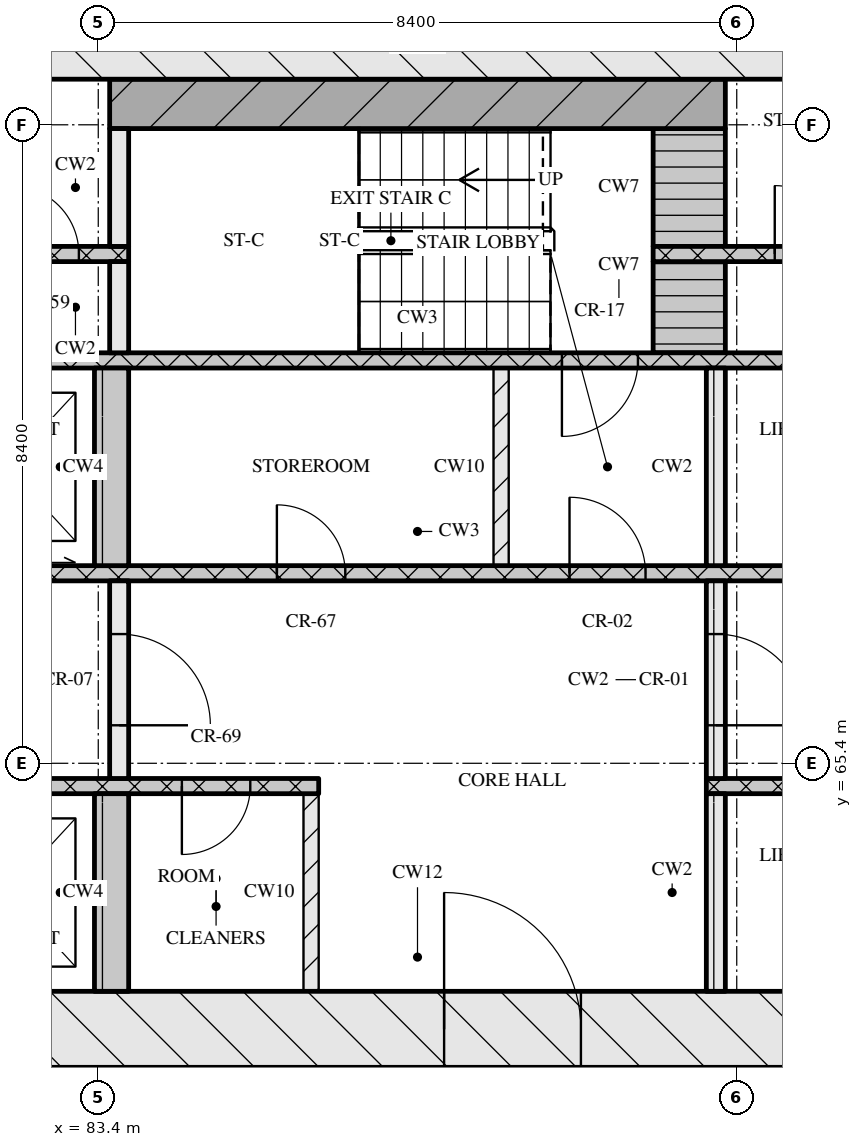
"""IFC4 building model, lengths in metres.
Left out: names, types, materials, properties, quantities, classifications, styles, units other than length and angle.
Written with IfcOpenShell. Run it as: python <this file> out.ifc"""

import sys

from ifc_helpers import new_model, si_unit, direction, frame, frame_2d, origin, place, context, subcontext, project, spatial, rectangle, extrude, element, fill, save


model = new_model("IFC4")
c1 = context("Model", 3, precision=1e-05, world=origin(), true_north=direction((0.0, 1.0)))
c2 = subcontext(c1, "Body", "Model", "MODEL_VIEW")
j1 = project(units=[si_unit("LENGTHUNIT", "METRE"), si_unit("PLANEANGLEUNIT", "RADIAN")], contexts=[c1])
p1 = place(None, origin())
s1 = spatial("IfcSite", under=j1, at=p1, CompositionType="ELEMENT")
p2 = place(p1, origin())
s2 = spatial("IfcBuilding", under=s1, at=p2, CompositionType="ELEMENT")
p3 = place(p2, frame((0.0, 0.0, 113.25)))
s3 = spatial("IfcBuildingStorey", under=s2, at=p3, CompositionType="ELEMENT", Elevation=113.25)
p4 = place(p3, frame((66.8, 61.9, 0.0), z_axis=(0.0, 0.0, 1.0), x_axis=(1.0, 0.0, 0.0)))
e1 = element("IfcWall", 1, at=p4, inside=s3, PredefinedType="SOLIDWALL", context=c2, shape_type="SweptSolid", body=[
    extrude(rectangle(XDim=41.6, YDim=1.0, at=frame_2d((20.8, 0.0))), origin(), (0.0, 0.0, 1.0), 3.32),
])
p5 = place(p4, frame((21.15, 0.0, 0.0)))
e2 = element("IfcOpeningElement", 2, at=p5, cuts=e1, PredefinedType="OPENING", context=c2, shape_type="SweptSolid", body=[
    extrude(rectangle(XDim=1.8, YDim=2.1, at=frame_2d((0.9, 1.05))), frame((0.0, 0.51, 0.0), z_axis=(0.0, -1.0, 0.0), x_axis=(1.0, 0.0, 0.0)), (0.0, 0.0, 1.0), 1.02),
])
p6 = place(p3, frame((66.8, 74.9, 0.0), z_axis=(0.0, 0.0, 1.0), x_axis=(1.0, 0.0, 0.0)))
e3 = element("IfcWall", 3, at=p6, inside=s3, PredefinedType="SOLIDWALL", context=c2, shape_type="SweptSolid", body=[
    extrude(rectangle(XDim=41.6, YDim=1.0, at=frame_2d((20.8, 0.0))), origin(), (0.0, 0.0, 1.0), 3.32),
])
p7 = place(p3, frame((83.575, 62.4, 0.0), z_axis=(0.0, 0.0, 1.0), x_axis=(0.0, 1.0, 0.0)))
e4 = element("IfcWall", 4, at=p7, inside=s3, PredefinedType="SOLIDWALL", context=c2, shape_type="SweptSolid", body=[
    extrude(rectangle(XDim=2.6, YDim=0.45, at=frame_2d((1.3, 0.0))), origin(), (0.0, 0.0, 1.0), 3.32),
])
p8 = place(p3, frame((86.2, 62.4, 0.0), z_axis=(0.0, 0.0, 1.0), x_axis=(0.0, 1.0, 0.0)))
e5 = element("IfcWall", 5, at=p8, inside=s3, PredefinedType="PARTITIONING", context=c2, shape_type="SweptSolid", body=[
    extrude(rectangle(XDim=2.6, YDim=0.2, at=frame_2d((1.3, 0.0))), origin(), (0.0, 0.0, 1.0), 3.32),
])
p9 = place(p3, frame((91.525, 62.4, 0.0), z_axis=(0.0, 0.0, 1.0), x_axis=(0.0, 1.0, 0.0)))
e6 = element("IfcWall", 6, at=p9, inside=s3, PredefinedType="SOLIDWALL", context=c2, shape_type="SweptSolid", body=[
    extrude(rectangle(XDim=2.6, YDim=0.25, at=frame_2d((1.3, 0.0))), origin(), (0.0, 0.0, 1.0), 3.32),
])
p10 = place(p3, frame((67.8, 65.1, 0.0), z_axis=(0.0, 0.0, 1.0), x_axis=(1.0, 0.0, 0.0)))
e7 = element("IfcWall", 7, at=p10, inside=s3, PredefinedType="SOLIDWALL", context=c2, shape_type="SweptSolid", body=[
    extrude(rectangle(XDim=18.5, YDim=0.2, at=frame_2d((9.25, 0.0))), origin(), (0.0, 0.0, 1.0), 3.32),
])
p11 = place(p10, frame((7.27, 0.0, 0.0)))
e8 = element("IfcOpeningElement", 8, at=p11, cuts=e7, PredefinedType="OPENING", context=c2, shape_type="SweptSolid", body=[
    extrude(rectangle(XDim=0.9, YDim=2.1, at=frame_2d((0.45, 1.05))), frame((0.0, 0.11, 0.0), z_axis=(0.0, -1.0, 0.0), x_axis=(1.0, 0.0, 0.0)), (0.0, 0.0, 1.0), 0.22),
])
p12 = place(p10, frame((8.85, 0.0, 0.0)))
e9 = element("IfcOpeningElement", 9, at=p12, cuts=e7, PredefinedType="OPENING", context=c2, shape_type="SweptSolid", body=[
    extrude(rectangle(XDim=1.1, YDim=2.1, at=frame_2d((0.55, 1.05))), frame((0.0, 0.11, 0.0), z_axis=(0.0, -1.0, 0.0), x_axis=(1.0, 0.0, 0.0)), (0.0, 0.0, 1.0), 0.22),
])
p13 = place(p10, frame((11.35, 0.0, 0.0)))
e10 = element("IfcOpeningElement", 10, at=p13, cuts=e7, PredefinedType="OPENING", context=c2, shape_type="SweptSolid", body=[
    extrude(rectangle(XDim=1.1, YDim=2.1, at=frame_2d((0.55, 1.05))), frame((0.0, 0.11, 0.0), z_axis=(0.0, -1.0, 0.0), x_axis=(1.0, 0.0, 0.0)), (0.0, 0.0, 1.0), 0.22),
])
p14 = place(p10, frame((13.85, 0.0, 0.0)))
e11 = element("IfcOpeningElement", 11, at=p14, cuts=e7, PredefinedType="OPENING", context=c2, shape_type="SweptSolid", body=[
    extrude(rectangle(XDim=1.1, YDim=2.1, at=frame_2d((0.55, 1.05))), frame((0.0, 0.11, 0.0), z_axis=(0.0, -1.0, 0.0), x_axis=(1.0, 0.0, 0.0)), (0.0, 0.0, 1.0), 0.22),
])
p15 = place(p10, frame((16.7, 0.0, 0.0)))
e12 = element("IfcOpeningElement", 12, at=p15, cuts=e7, PredefinedType="OPENING", context=c2, shape_type="SweptSolid", body=[
    extrude(rectangle(XDim=0.9, YDim=2.1, at=frame_2d((0.45, 1.05))), frame((0.0, 0.11, 0.0), z_axis=(0.0, -1.0, 0.0), x_axis=(1.0, 0.0, 0.0)), (0.0, 0.0, 1.0), 0.22),
])
p16 = place(p3, frame((91.4, 65.1, 0.0), z_axis=(0.0, 0.0, 1.0), x_axis=(1.0, 0.0, 0.0)))
e13 = element("IfcWall", 13, at=p16, inside=s3, PredefinedType="SOLIDWALL", context=c2, shape_type="SweptSolid", body=[
    extrude(rectangle(XDim=16.0, YDim=0.2, at=frame_2d((8.0, 0.0))), origin(), (0.0, 0.0, 1.0), 3.32),
])
p17 = place(p16, frame((7.83, 0.0, 0.0)))
e14 = element("IfcOpeningElement", 14, at=p17, cuts=e13, PredefinedType="OPENING", context=c2, shape_type="SweptSolid", body=[
    extrude(rectangle(XDim=0.9, YDim=2.1, at=frame_2d((0.45, 1.05))), frame((0.0, 0.11, 0.0), z_axis=(0.0, -1.0, 0.0), x_axis=(1.0, 0.0, 0.0)), (0.0, 0.0, 1.0), 0.22),
])
p18 = place(p3, frame((83.675, 65.2, 0.0), z_axis=(0.0, 0.0, 1.0), x_axis=(0.0, 1.0, 0.0)))
e15 = element("IfcWall", 15, at=p18, inside=s3, PredefinedType="SOLIDWALL", context=c2, shape_type="SweptSolid", body=[
    extrude(rectangle(XDim=2.6, YDim=0.25, at=frame_2d((1.3, 0.0))), origin(), (0.0, 0.0, 1.0), 3.32),
])
p19 = place(p18, frame((0.7, 0.0, 0.0)))
e16 = element("IfcOpeningElement", 16, at=p19, cuts=e15, PredefinedType="OPENING", context=c2, shape_type="SweptSolid", body=[
    extrude(rectangle(XDim=1.2, YDim=2.1, at=frame_2d((0.6, 1.05))), frame((0.0, 0.135, 0.0), z_axis=(0.0, -1.0, 0.0), x_axis=(1.0, 0.0, 0.0)), (0.0, 0.0, 1.0), 0.27),
])
p20 = place(p3, frame((91.525, 65.2, 0.0), z_axis=(0.0, 0.0, 1.0), x_axis=(0.0, 1.0, 0.0)))
e17 = element("IfcWall", 17, at=p20, inside=s3, PredefinedType="SOLIDWALL", context=c2, shape_type="SweptSolid", body=[
    extrude(rectangle(XDim=2.6, YDim=0.25, at=frame_2d((1.3, 0.0))), origin(), (0.0, 0.0, 1.0), 3.32),
])
p21 = place(p20, frame((0.7, 0.0, 0.0)))
e18 = element("IfcOpeningElement", 18, at=p21, cuts=e17, PredefinedType="OPENING", context=c2, shape_type="SweptSolid", body=[
    extrude(rectangle(XDim=1.2, YDim=2.1, at=frame_2d((0.6, 1.05))), frame((0.0, 0.135, 0.0), z_axis=(0.0, -1.0, 0.0), x_axis=(1.0, 0.0, 0.0)), (0.0, 0.0, 1.0), 0.27),
])
p22 = place(p3, frame((76.05, 67.9, 0.0), z_axis=(0.0, 0.0, 1.0), x_axis=(1.0, 0.0, 0.0)))
e19 = element("IfcWall", 19, at=p22, inside=s3, PredefinedType="SOLIDWALL", context=c2, shape_type="SweptSolid", body=[
    extrude(rectangle(XDim=23.1, YDim=0.2, at=frame_2d((11.55, 0.0))), origin(), (0.0, 0.0, 1.0), 3.32),
])
p23 = place(p22, frame((0.6, 0.0, 0.0)))
e20 = element("IfcOpeningElement", 20, at=p23, cuts=e19, PredefinedType="OPENING", context=c2, shape_type="SweptSolid", body=[
    extrude(rectangle(XDim=1.1, YDim=2.1, at=frame_2d((0.55, 1.05))), frame((0.0, 0.11, 0.0), z_axis=(0.0, -1.0, 0.0), x_axis=(1.0, 0.0, 0.0)), (0.0, 0.0, 1.0), 0.22),
])
p24 = place(p22, frame((3.1, 0.0, 0.0)))
e21 = element("IfcOpeningElement", 21, at=p24, cuts=e19, PredefinedType="OPENING", context=c2, shape_type="SweptSolid", body=[
    extrude(rectangle(XDim=1.1, YDim=2.1, at=frame_2d((0.55, 1.05))), frame((0.0, 0.11, 0.0), z_axis=(0.0, -1.0, 0.0), x_axis=(1.0, 0.0, 0.0)), (0.0, 0.0, 1.0), 0.22),
])
p25 = place(p22, frame((5.6, 0.0, 0.0)))
e22 = element("IfcOpeningElement", 22, at=p25, cuts=e19, PredefinedType="OPENING", context=c2, shape_type="SweptSolid", body=[
    extrude(rectangle(XDim=1.1, YDim=2.1, at=frame_2d((0.55, 1.05))), frame((0.0, 0.11, 0.0), z_axis=(0.0, -1.0, 0.0), x_axis=(1.0, 0.0, 0.0)), (0.0, 0.0, 1.0), 0.22),
])
p26 = place(p22, frame((9.7, 0.0, 0.0)))
e23 = element("IfcOpeningElement", 23, at=p26, cuts=e19, PredefinedType="OPENING", context=c2, shape_type="SweptSolid", body=[
    extrude(rectangle(XDim=0.9, YDim=2.1, at=frame_2d((0.45, 1.05))), frame((0.0, 0.11, 0.0), z_axis=(0.0, -1.0, 0.0), x_axis=(1.0, 0.0, 0.0)), (0.0, 0.0, 1.0), 0.22),
])
p27 = place(p22, frame((13.55, 0.0, 0.0)))
e24 = element("IfcOpeningElement", 24, at=p27, cuts=e19, PredefinedType="OPENING", context=c2, shape_type="SweptSolid", body=[
    extrude(rectangle(XDim=1.0, YDim=2.1, at=frame_2d((0.5, 1.05))), frame((0.0, 0.11, 0.0), z_axis=(0.0, -1.0, 0.0), x_axis=(1.0, 0.0, 0.0)), (0.0, 0.0, 1.0), 0.22),
])
p28 = place(p3, frame((83.575, 68.0, 0.0), z_axis=(0.0, 0.0, 1.0), x_axis=(0.0, 1.0, 0.0)))
e25 = element("IfcWall", 25, at=p28, inside=s3, PredefinedType="SOLIDWALL", context=c2, shape_type="SweptSolid", body=[
    extrude(rectangle(XDim=2.6, YDim=0.45, at=frame_2d((1.3, 0.0))), origin(), (0.0, 0.0, 1.0), 3.32),
])
p29 = place(p3, frame((88.7, 68.0, 0.0), z_axis=(0.0, 0.0, 1.0), x_axis=(0.0, 1.0, 0.0)))
e26 = element("IfcWall", 26, at=p29, inside=s3, PredefinedType="PARTITIONING", context=c2, shape_type="SweptSolid", body=[
    extrude(rectangle(XDim=2.6, YDim=0.2, at=frame_2d((1.3, 0.0))), origin(), (0.0, 0.0, 1.0), 3.32),
])
p30 = place(p3, frame((91.525, 68.0, 0.0), z_axis=(0.0, 0.0, 1.0), x_axis=(0.0, 1.0, 0.0)))
e27 = element("IfcWall", 27, at=p30, inside=s3, PredefinedType="SOLIDWALL", context=c2, shape_type="SweptSolid", body=[
    extrude(rectangle(XDim=2.6, YDim=0.25, at=frame_2d((1.3, 0.0))), origin(), (0.0, 0.0, 1.0), 3.32),
])
p31 = place(p3, frame((67.8, 70.7, 0.0), z_axis=(0.0, 0.0, 1.0), x_axis=(1.0, 0.0, 0.0)))
e28 = element("IfcWall", 28, at=p31, inside=s3, PredefinedType="SOLIDWALL", context=c2, shape_type="SweptSolid", body=[
    extrude(rectangle(XDim=39.6, YDim=0.2, at=frame_2d((19.8, 0.0))), origin(), (0.0, 0.0, 1.0), 3.32),
])
p32 = place(p31, frame((0.65, 0.0, 0.0)))
e29 = element("IfcOpeningElement", 29, at=p32, cuts=e28, PredefinedType="OPENING", context=c2, shape_type="SweptSolid", body=[
    extrude(rectangle(XDim=1.1, YDim=2.1, at=frame_2d((0.55, 1.05))), frame((0.0, 0.11, 0.0), z_axis=(0.0, -1.0, 0.0), x_axis=(1.0, 0.0, 0.0)), (0.0, 0.0, 1.0), 0.22),
])
p33 = place(p31, frame((3.25, 0.0, 0.0)))
e30 = element("IfcOpeningElement", 30, at=p33, cuts=e28, PredefinedType="OPENING", context=c2, shape_type="SweptSolid", body=[
    extrude(rectangle(XDim=1.1, YDim=2.1, at=frame_2d((0.55, 1.05))), frame((0.0, 0.11, 0.0), z_axis=(0.0, -1.0, 0.0), x_axis=(1.0, 0.0, 0.0)), (0.0, 0.0, 1.0), 0.22),
])
p34 = place(p31, frame((5.9, 0.0, 0.0)))
e31 = element("IfcOpeningElement", 31, at=p34, cuts=e28, PredefinedType="OPENING", context=c2, shape_type="SweptSolid", body=[
    extrude(rectangle(XDim=1.0, YDim=2.1, at=frame_2d((0.5, 1.05))), frame((0.0, 0.11, 0.0), z_axis=(0.0, -1.0, 0.0), x_axis=(1.0, 0.0, 0.0)), (0.0, 0.0, 1.0), 0.22),
])
p35 = place(p31, frame((21.7, 0.0, 0.0)))
e32 = element("IfcOpeningElement", 32, at=p35, cuts=e28, PredefinedType="OPENING", context=c2, shape_type="SweptSolid", body=[
    extrude(rectangle(XDim=1.0, YDim=2.1, at=frame_2d((0.5, 1.05))), frame((0.0, 0.11, 0.0), z_axis=(0.0, -1.0, 0.0), x_axis=(1.0, 0.0, 0.0)), (0.0, 0.0, 1.0), 0.22),
])
p36 = place(p31, frame((32.7, 0.0, 0.0)))
e33 = element("IfcOpeningElement", 33, at=p36, cuts=e28, PredefinedType="OPENING", context=c2, shape_type="SweptSolid", body=[
    extrude(rectangle(XDim=1.0, YDim=2.1, at=frame_2d((0.5, 1.05))), frame((0.0, 0.11, 0.0), z_axis=(0.0, -1.0, 0.0), x_axis=(1.0, 0.0, 0.0)), (0.0, 0.0, 1.0), 0.22),
])
p37 = place(p31, frame((35.25, 0.0, 0.0)))
e34 = element("IfcOpeningElement", 34, at=p37, cuts=e28, PredefinedType="OPENING", context=c2, shape_type="SweptSolid", body=[
    extrude(rectangle(XDim=1.1, YDim=2.1, at=frame_2d((0.55, 1.05))), frame((0.0, 0.11, 0.0), z_axis=(0.0, -1.0, 0.0), x_axis=(1.0, 0.0, 0.0)), (0.0, 0.0, 1.0), 0.22),
])
p38 = place(p31, frame((37.85, 0.0, 0.0)))
e35 = element("IfcOpeningElement", 35, at=p38, cuts=e28, PredefinedType="OPENING", context=c2, shape_type="SweptSolid", body=[
    extrude(rectangle(XDim=1.1, YDim=2.1, at=frame_2d((0.55, 1.05))), frame((0.0, 0.11, 0.0), z_axis=(0.0, -1.0, 0.0), x_axis=(1.0, 0.0, 0.0)), (0.0, 0.0, 1.0), 0.22),
])
p39 = place(p3, frame((83.675, 70.8, 0.0), z_axis=(0.0, 0.0, 1.0), x_axis=(0.0, 1.0, 0.0)))
e36 = element("IfcWall", 36, at=p39, inside=s3, PredefinedType="SOLIDWALL", context=c2, shape_type="SweptSolid", body=[
    extrude(rectangle(XDim=1.2, YDim=0.25, at=frame_2d((0.6, 0.0))), origin(), (0.0, 0.0, 1.0), 3.32),
])
p40 = place(p3, frame((91.175, 70.8, 0.0), z_axis=(0.0, 0.0, 1.0), x_axis=(0.0, 1.0, 0.0)))
e37 = element("IfcWall", 37, at=p40, inside=s3, PredefinedType="SOLIDWALL", context=c2, shape_type="SweptSolid", body=[
    extrude(rectangle(XDim=1.2, YDim=0.95, at=frame_2d((0.6, 0.0))), origin(), (0.0, 0.0, 1.0), 3.32),
])
p41 = place(p3, frame((72.8, 72.1, 0.0), z_axis=(0.0, 0.0, 1.0), x_axis=(1.0, 0.0, 0.0)))
e38 = element("IfcWall", 38, at=p41, inside=s3, PredefinedType="SOLIDWALL", context=c2, shape_type="SweptSolid", body=[
    extrude(rectangle(XDim=11.0, YDim=0.2, at=frame_2d((5.5, 0.0))), origin(), (0.0, 0.0, 1.0), 3.32),
])
p42 = place(p41, frame((1.25, 0.0, 0.0)))
e39 = element("IfcOpeningElement", 39, at=p42, cuts=e38, PredefinedType="OPENING", context=c2, shape_type="SweptSolid", body=[
    extrude(rectangle(XDim=0.9, YDim=2.1, at=frame_2d((0.45, 1.05))), frame((0.0, 0.11, 0.0), z_axis=(0.0, -1.0, 0.0), x_axis=(1.0, 0.0, 0.0)), (0.0, 0.0, 1.0), 0.22),
])
p43 = place(p41, frame((4.65, 0.0, 0.0)))
e40 = element("IfcOpeningElement", 40, at=p43, cuts=e38, PredefinedType="OPENING", context=c2, shape_type="SweptSolid", body=[
    extrude(rectangle(XDim=0.9, YDim=2.1, at=frame_2d((0.45, 1.05))), frame((0.0, 0.11, 0.0), z_axis=(0.0, -1.0, 0.0), x_axis=(1.0, 0.0, 0.0)), (0.0, 0.0, 1.0), 0.22),
])
p44 = place(p41, frame((7.47, 0.0, 0.0)))
e41 = element("IfcOpeningElement", 41, at=p44, cuts=e38, PredefinedType="OPENING", context=c2, shape_type="SweptSolid", body=[
    extrude(rectangle(XDim=0.9, YDim=2.1, at=frame_2d((0.45, 1.05))), frame((0.0, 0.11, 0.0), z_axis=(0.0, -1.0, 0.0), x_axis=(1.0, 0.0, 0.0)), (0.0, 0.0, 1.0), 0.22),
])
p45 = place(p41, frame((9.445, 0.0, 0.0)))
e42 = element("IfcOpeningElement", 42, at=p45, cuts=e38, PredefinedType="OPENING", context=c2, shape_type="SweptSolid", body=[
    extrude(rectangle(XDim=0.9, YDim=2.1, at=frame_2d((0.45, 1.05))), frame((0.0, 0.11, 0.0), z_axis=(0.0, -1.0, 0.0), x_axis=(1.0, 0.0, 0.0)), (0.0, 0.0, 1.0), 0.22),
])
p46 = place(p3, frame((90.7, 72.1, 0.0), z_axis=(0.0, 0.0, 1.0), x_axis=(1.0, 0.0, 0.0)))
e43 = element("IfcWall", 43, at=p46, inside=s3, PredefinedType="SOLIDWALL", context=c2, shape_type="SweptSolid", body=[
    extrude(rectangle(XDim=11.7, YDim=0.2, at=frame_2d((5.85, 0.0))), origin(), (0.0, 0.0, 1.0), 3.32),
])
p47 = place(p46, frame((1.6, 0.0, 0.0)))
e44 = element("IfcOpeningElement", 44, at=p47, cuts=e43, PredefinedType="OPENING", context=c2, shape_type="SweptSolid", body=[
    extrude(rectangle(XDim=0.9, YDim=2.1, at=frame_2d((0.45, 1.05))), frame((0.0, 0.11, 0.0), z_axis=(0.0, -1.0, 0.0), x_axis=(1.0, 0.0, 0.0)), (0.0, 0.0, 1.0), 0.22),
])
p48 = place(p46, frame((5.335, 0.0, 0.0)))
e45 = element("IfcOpeningElement", 45, at=p48, cuts=e43, PredefinedType="OPENING", context=c2, shape_type="SweptSolid", body=[
    extrude(rectangle(XDim=0.9, YDim=2.1, at=frame_2d((0.45, 1.05))), frame((0.0, 0.11, 0.0), z_axis=(0.0, -1.0, 0.0), x_axis=(1.0, 0.0, 0.0)), (0.0, 0.0, 1.0), 0.22),
])
p49 = place(p46, frame((9.55, 0.0, 0.0)))
e46 = element("IfcOpeningElement", 46, at=p49, cuts=e43, PredefinedType="OPENING", context=c2, shape_type="SweptSolid", body=[
    extrude(rectangle(XDim=0.9, YDim=2.1, at=frame_2d((0.45, 1.05))), frame((0.0, 0.11, 0.0), z_axis=(0.0, -1.0, 0.0), x_axis=(1.0, 0.0, 0.0)), (0.0, 0.0, 1.0), 0.22),
])
p50 = place(p3, frame((83.675, 72.2, 0.0), z_axis=(0.0, 0.0, 1.0), x_axis=(0.0, 1.0, 0.0)))
e47 = element("IfcWall", 47, at=p50, inside=s3, PredefinedType="SOLIDWALL", context=c2, shape_type="SweptSolid", body=[
    extrude(rectangle(XDim=1.55, YDim=0.25, at=frame_2d((0.775, 0.0))), origin(), (0.0, 0.0, 1.0), 3.32),
])
p51 = place(p3, frame((91.175, 72.2, 0.0), z_axis=(0.0, 0.0, 1.0), x_axis=(0.0, 1.0, 0.0)))
e48 = element("IfcWall", 48, at=p51, inside=s3, PredefinedType="SOLIDWALL", context=c2, shape_type="SweptSolid", body=[
    extrude(rectangle(XDim=1.55, YDim=0.95, at=frame_2d((0.775, 0.0))), origin(), (0.0, 0.0, 1.0), 3.32),
])
p52 = place(p3, frame((83.55, 74.075, 0.0), z_axis=(0.0, 0.0, 1.0), x_axis=(1.0, 0.0, 0.0)))
e49 = element("IfcWall", 49, at=p52, inside=s3, PredefinedType="SOLIDWALL", context=c2, shape_type="SweptSolid", body=[
    extrude(rectangle(XDim=8.1, YDim=0.65, at=frame_2d((4.05, 0.0))), origin(), (0.0, 0.0, 1.0), 3.32),
])
p53 = place(p5, origin())
e50 = element("IfcDoor", 50, at=p53, inside=s3, OperationType="DOUBLE_DOOR_SINGLE_SWING", PredefinedType="DOOR", context=c2, shape_type="SweptSolid", body=[
    extrude(rectangle(XDim=1.8, YDim=2.1, at=frame_2d((0.9, 1.05))), frame((0.0, 0.025, 0.0), z_axis=(0.0, -1.0, 0.0), x_axis=(1.0, 0.0, 0.0)), (0.0, 0.0, 1.0), 0.05),
])
fill(e2, e50)
p54 = place(p15, origin())
e51 = element("IfcDoor", 51, at=p54, inside=s3, OperationType="SINGLE_SWING_RIGHT", PredefinedType="DOOR", context=c2, shape_type="SweptSolid", body=[
    extrude(rectangle(XDim=0.9, YDim=2.1, at=frame_2d((0.45, 1.05))), frame((0.0, 0.025, 0.0), z_axis=(0.0, -1.0, 0.0), x_axis=(1.0, 0.0, 0.0)), (0.0, 0.0, 1.0), 0.05),
])
fill(e12, e51)
p55 = place(p19, origin())
e52 = element("IfcDoor", 52, at=p55, inside=s3, OperationType="SINGLE_SWING_RIGHT", PredefinedType="DOOR", context=c2, shape_type="SweptSolid", body=[
    extrude(rectangle(XDim=1.2, YDim=2.1, at=frame_2d((0.6, 1.05))), frame((0.0, 0.025, 0.0), z_axis=(0.0, -1.0, 0.0), x_axis=(1.0, 0.0, 0.0)), (0.0, 0.0, 1.0), 0.05),
])
fill(e16, e52)
p56 = place(p21, origin())
e53 = element("IfcDoor", 53, at=p56, inside=s3, OperationType="SINGLE_SWING_RIGHT", PredefinedType="DOOR", context=c2, shape_type="SweptSolid", body=[
    extrude(rectangle(XDim=1.2, YDim=2.1, at=frame_2d((0.6, 1.05))), frame((0.0, 0.025, 0.0), z_axis=(0.0, -1.0, 0.0), x_axis=(1.0, 0.0, 0.0)), (0.0, 0.0, 1.0), 0.05),
])
fill(e18, e53)
p57 = place(p26, origin())
e54 = element("IfcDoor", 54, at=p57, inside=s3, OperationType="SINGLE_SWING_LEFT", PredefinedType="DOOR", context=c2, shape_type="SweptSolid", body=[
    extrude(rectangle(XDim=0.9, YDim=2.1, at=frame_2d((0.45, 1.05))), frame((0.0, 0.025, 0.0), z_axis=(0.0, -1.0, 0.0), x_axis=(1.0, 0.0, 0.0)), (0.0, 0.0, 1.0), 0.05),
])
fill(e23, e54)
p58 = place(p27, origin())
e55 = element("IfcDoor", 55, at=p58, inside=s3, OperationType="SINGLE_SWING_LEFT", PredefinedType="DOOR", context=c2, shape_type="SweptSolid", body=[
    extrude(rectangle(XDim=1.0, YDim=2.1, at=frame_2d((0.5, 1.05))), frame((0.0, 0.025, 0.0), z_axis=(0.0, -1.0, 0.0), x_axis=(1.0, 0.0, 0.0)), (0.0, 0.0, 1.0), 0.05),
])
fill(e24, e55)
p59 = place(p35, origin())
e56 = element("IfcDoor", 56, at=p59, inside=s3, OperationType="SINGLE_SWING_RIGHT", PredefinedType="DOOR", context=c2, shape_type="SweptSolid", body=[
    extrude(rectangle(XDim=1.0, YDim=2.1, at=frame_2d((0.5, 1.05))), frame((0.0, 0.025, 0.0), z_axis=(0.0, -1.0, 0.0), x_axis=(1.0, 0.0, 0.0)), (0.0, 0.0, 1.0), 0.05),
])
fill(e32, e56)
p60 = place(p45, origin())
e57 = element("IfcDoor", 57, at=p60, inside=s3, OperationType="SINGLE_SWING_LEFT", PredefinedType="DOOR", context=c2, shape_type="SweptSolid", body=[
    extrude(rectangle(XDim=0.9, YDim=2.1, at=frame_2d((0.45, 1.05))), frame((0.0, 0.025, 0.0), z_axis=(0.0, -1.0, 0.0), x_axis=(1.0, 0.0, 0.0)), (0.0, 0.0, 1.0), 0.05),
])
fill(e42, e57)
p61 = place(p47, origin())
e58 = element("IfcDoor", 58, at=p61, inside=s3, OperationType="SINGLE_SWING_LEFT", PredefinedType="DOOR", context=c2, shape_type="SweptSolid", body=[
    extrude(rectangle(XDim=0.9, YDim=2.1, at=frame_2d((0.45, 1.05))), frame((0.0, 0.025, 0.0), z_axis=(0.0, -1.0, 0.0), x_axis=(1.0, 0.0, 0.0)), (0.0, 0.0, 1.0), 0.05),
])
fill(e44, e58)
save(model, sys.argv[1])
